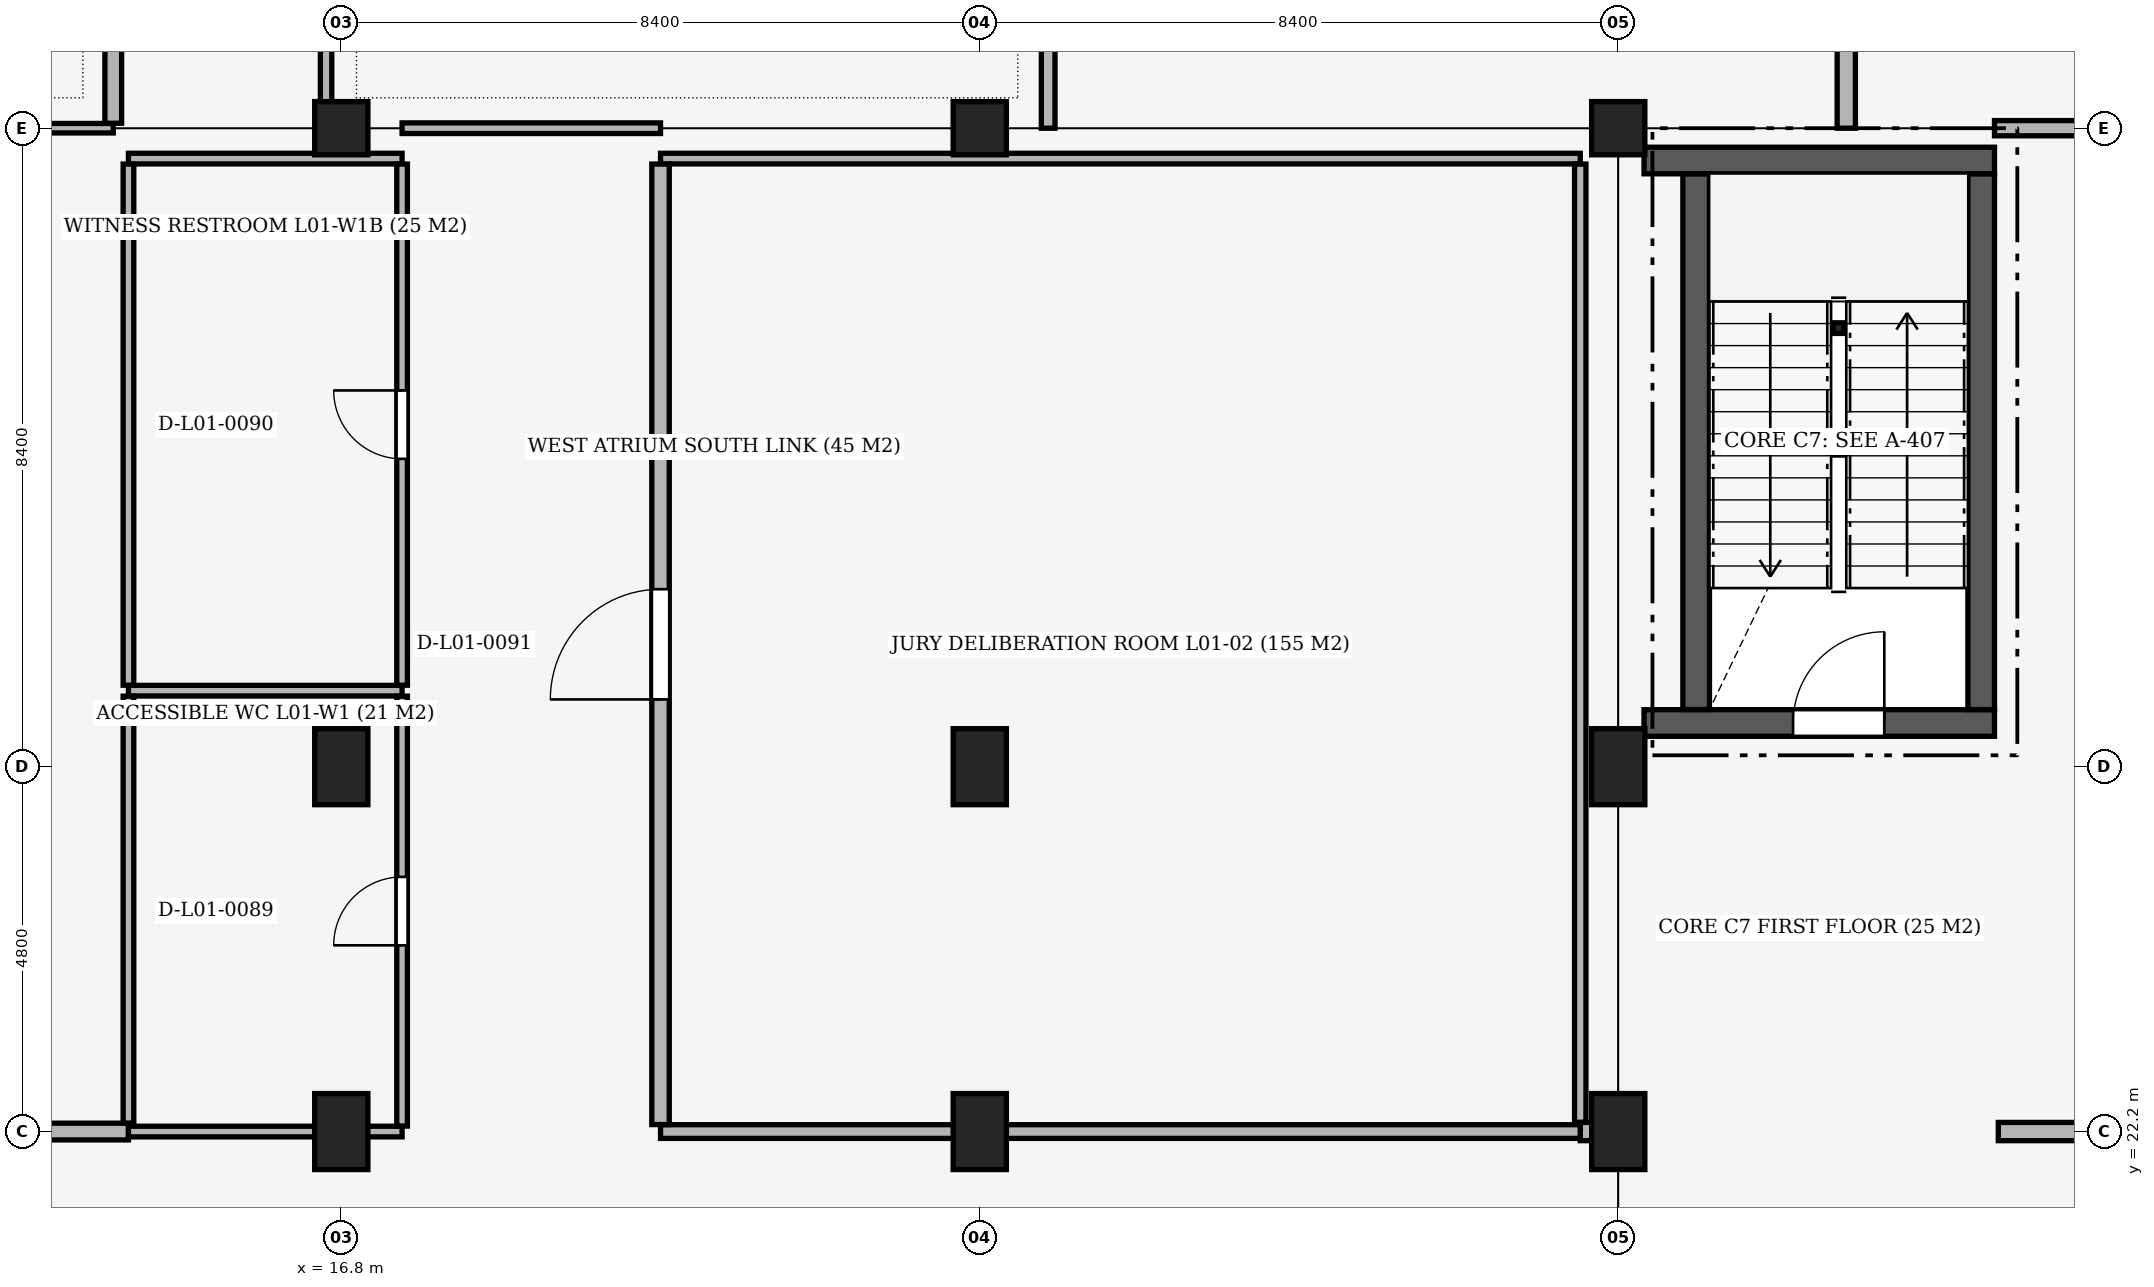
"""IFC4 building model, lengths in metres.
Left out: names, types, materials, properties, quantities, classifications, styles, units other than length and angle.
Written with IfcOpenShell. Run it as: python <this file> out.ifc"""

import sys

from ifc_helpers import new_model, si_unit, direction, frame, frame_2d, origin, origin_2d, place, context, subcontext, project, spatial, rectangle, hollow_circle, extrude, element, fill, save


model = new_model("IFC4")
c1 = context("Model", 3, precision=1e-05, world=origin(), true_north=direction((0.0, 1.0)))
c2 = subcontext(c1, "Body", "Model", "MODEL_VIEW")
j1 = project(units=[si_unit("LENGTHUNIT", "METRE"), si_unit("PLANEANGLEUNIT", "RADIAN")], contexts=[c1])
p1 = place(None, origin())
s1 = spatial("IfcSite", under=j1, at=p1, CompositionType="ELEMENT")
p2 = place(p1, origin())
s2 = spatial("IfcBuilding", under=s1, at=p2, CompositionType="ELEMENT")
p3 = place(p2, frame((0.0, 0.0, 5.1)))
s3 = spatial("IfcBuildingStorey", under=s2, at=p3, CompositionType="ELEMENT", Elevation=5.1)
for number, where, z_axis, x_axis in (
    (1, (16.8, 22.2, 0.0), (0.0, 0.0, 1.0), (1.0, 0.0, 0.0)),
    (2, (16.8, 27.0, 0.0), (0.0, 0.0, 1.0), (1.0, 0.0, 0.0)),
):
    element("IfcColumn", number, at=place(p3, frame(where, z_axis=z_axis, x_axis=x_axis)), inside=s3, PredefinedType="COLUMN", context=c2, shape_type="SweptSolid", body=[
        extrude(rectangle(XDim=0.7, YDim=1.0, at=origin_2d()), origin(), (0.0, 0.0, 1.0), 5.1),
    ])
p4 = place(p3, frame((16.8, 35.4, 0.0), z_axis=(0.0, 0.0, 1.0), x_axis=(1.0, 0.0, 0.0)))
e3 = element("IfcColumn", 3, at=p4, inside=s3, PredefinedType="COLUMN", context=c2, shape_type="SweptSolid", body=[
    extrude(rectangle(XDim=0.7, YDim=0.7, at=origin_2d()), origin(), (0.0, 0.0, 1.0), 5.1),
])
for number, where, z_axis, x_axis in (
    (4, (25.2, 22.2, 0.0), (0.0, 0.0, 1.0), (1.0, 0.0, 0.0)),
    (5, (25.2, 27.0, 0.0), (0.0, 0.0, 1.0), (1.0, 0.0, 0.0)),
):
    element("IfcColumn", number, at=place(p3, frame(where, z_axis=z_axis, x_axis=x_axis)), inside=s3, PredefinedType="COLUMN", context=c2, shape_type="SweptSolid", body=[
        extrude(rectangle(XDim=0.7, YDim=1.0, at=origin_2d()), origin(), (0.0, 0.0, 1.0), 5.1),
    ])
p5 = place(p3, frame((25.2, 35.4, 0.0), z_axis=(0.0, 0.0, 1.0), x_axis=(1.0, 0.0, 0.0)))
e6 = element("IfcColumn", 6, at=p5, inside=s3, PredefinedType="COLUMN", context=c2, shape_type="SweptSolid", body=[
    extrude(rectangle(XDim=0.7, YDim=0.7, at=origin_2d()), origin(), (0.0, 0.0, 1.0), 5.1),
])
for number, where, z_axis, x_axis in (
    (7, (33.6, 22.2, 0.0), (0.0, 0.0, 1.0), (1.0, 0.0, 0.0)),
    (8, (33.6, 27.0, 0.0), (0.0, 0.0, 1.0), (1.0, 0.0, 0.0)),
):
    element("IfcColumn", number, at=place(p3, frame(where, z_axis=z_axis, x_axis=x_axis)), inside=s3, PredefinedType="COLUMN", context=c2, shape_type="SweptSolid", body=[
        extrude(rectangle(XDim=0.7, YDim=1.0, at=origin_2d()), origin(), (0.0, 0.0, 1.0), 5.1),
    ])
p6 = place(p3, frame((33.6, 35.4, 0.0), z_axis=(0.0, 0.0, 1.0), x_axis=(1.0, 0.0, 0.0)))
e9 = element("IfcColumn", 9, at=p6, inside=s3, PredefinedType="COLUMN", context=c2, shape_type="SweptSolid", body=[
    extrude(rectangle(XDim=0.7, YDim=0.7, at=origin_2d()), origin(), (0.0, 0.0, 1.0), 5.1),
])
for number, where, z_axis, x_axis in (
    (10, (36.5, 32.77, -2.98), (0.0, 0.0, 1.0), (1.0, 0.0, 0.0)),
    (11, (36.5, 31.17, -2.98), (0.0, 0.0, 1.0), (1.0, 0.0, 0.0)),
):
    element("IfcColumn", number, at=place(p3, frame(where, z_axis=z_axis, x_axis=x_axis)), inside=s3, PredefinedType="COLUMN", context=c2, shape_type="SweptSolid", body=[
        extrude(hollow_circle(Radius=0.07, WallThickness=0.008, at=origin_2d()), origin(), (0.0, 0.0, 1.0), 5.1),
    ])
p7 = place(p3, frame((33.939, 34.975, 0.0), z_axis=(0.0, 0.0, 1.0), x_axis=(1.0, 0.0, 0.0)))
e12 = element("IfcWall", 12, at=p7, inside=s3, PredefinedType="SHEAR", context=c2, shape_type="SweptSolid", body=[
    extrude(rectangle(XDim=4.611, YDim=0.35, at=frame_2d((2.306, 0.0))), origin(), (0.0, 0.0, 1.0), 4.82),
])
p8 = place(p3, frame((33.939, 27.575, 0.0), z_axis=(0.0, 0.0, 1.0), x_axis=(1.0, 0.0, 0.0)))
e13 = element("IfcWall", 13, at=p8, inside=s3, PredefinedType="SHEAR", context=c2, shape_type="SweptSolid", body=[
    extrude(rectangle(XDim=4.611, YDim=0.35, at=frame_2d((2.306, 0.0))), origin(), (0.0, 0.0, 1.0), 4.82),
])
p9 = place(p8, frame((1.961, 0.0, 0.0)))
e14 = element("IfcOpeningElement", 14, at=p9, cuts=e13, PredefinedType="OPENING", context=c2, shape_type="SweptSolid", body=[
    extrude(rectangle(XDim=1.2, YDim=2.2, at=frame_2d((0.6, 1.1))), frame((0.0, 0.19, 0.0), z_axis=(0.0, -1.0, 0.0), x_axis=(1.0, 0.0, 0.0)), (0.0, 0.0, 1.0), 0.38),
])
for number, where, z_axis, x_axis in (
    (15, (34.625, 27.752, 0.0), (0.0, 0.0, 1.0), (0.0, 1.0, 0.0)),
    (16, (38.375, 27.752, 0.0), (0.0, 0.0, 1.0), (0.0, 1.0, 0.0)),
):
    element("IfcWall", number, at=place(p3, frame(where, z_axis=z_axis, x_axis=x_axis)), inside=s3, PredefinedType="SHEAR", context=c2, shape_type="SweptSolid", body=[
        extrude(rectangle(XDim=7.046, YDim=0.35, at=frame_2d((3.523, 0.0))), origin(), (0.0, 0.0, 1.0), 4.82),
    ])
p10 = place(p3, frame((33.1, 22.2, 0.0), z_axis=(0.0, 0.0, 1.0), x_axis=(1.0, 0.0, 0.0)))
e17 = element("IfcWall", 17, at=p10, inside=s3, PredefinedType="PARTITIONING", context=c2, shape_type="SweptSolid", body=[
    extrude(rectangle(XDim=0.5, YDim=0.24, at=frame_2d((0.25, 0.0))), origin(), (0.0, 0.0, 1.0), 4.07),
])
p11 = place(p3, frame((0.5, 22.2, 0.0), z_axis=(0.0, 0.0, 1.0), x_axis=(1.0, 0.0, 0.0)))
e18 = element("IfcWall", 18, at=p11, inside=s3, PredefinedType="PARTITIONING", context=c2, shape_type="SweptSolid", body=[
    extrude(rectangle(XDim=13.5, YDim=0.22, at=frame_2d((6.75, 0.0))), origin(), (0.0, 0.0, 1.0), 4.07),
])
p12 = place(p11, frame((5.375, 0.0, 0.0)))
e19 = element("IfcOpeningElement", 19, at=p12, cuts=e18, PredefinedType="OPENING", context=c2, shape_type="SweptSolid", body=[
    extrude(rectangle(XDim=0.95, YDim=2.1, at=frame_2d((0.475, 1.05))), frame((0.0, 0.125, 0.0), z_axis=(0.0, -1.0, 0.0), x_axis=(1.0, 0.0, 0.0)), (0.0, 0.0, 1.0), 0.25),
])
p13 = place(p3, frame((14.0, 22.2, 0.0), z_axis=(0.0, 0.0, 1.0), x_axis=(1.0, 0.0, 0.0)))
e20 = element("IfcWall", 20, at=p13, inside=s3, PredefinedType="PARTITIONING", context=c2, shape_type="SweptSolid", body=[
    extrude(rectangle(XDim=3.6, YDim=0.14, at=frame_2d((1.8, 0.0))), origin(), (0.0, 0.0, 1.0), 4.07),
])
p14 = place(p3, frame((21.0, 22.2, 0.0), z_axis=(0.0, 0.0, 1.0), x_axis=(1.0, 0.0, 0.0)))
e21 = element("IfcWall", 21, at=p14, inside=s3, PredefinedType="PARTITIONING", context=c2, shape_type="SweptSolid", body=[
    extrude(rectangle(XDim=12.1, YDim=0.18, at=frame_2d((6.05, 0.0))), origin(), (0.0, 0.0, 1.0), 4.07),
])
p15 = place(p3, frame((38.6, 22.2, 0.0), z_axis=(0.0, 0.0, 1.0), x_axis=(1.0, 0.0, 0.0)))
e22 = element("IfcWall", 22, at=p15, inside=s3, PredefinedType="PARTITIONING", context=c2, shape_type="SweptSolid", body=[
    extrude(rectangle(XDim=10.4, YDim=0.24, at=frame_2d((5.2, 0.0))), origin(), (0.0, 0.0, 1.0), 4.07),
])
p16 = place(p15, frame((5.025, 0.0, 0.0)))
e23 = element("IfcOpeningElement", 23, at=p16, cuts=e22, PredefinedType="OPENING", context=c2, shape_type="SweptSolid", body=[
    extrude(rectangle(XDim=1.25, YDim=2.2, at=frame_2d((0.625, 1.1))), frame((0.0, 0.135, 0.0), z_axis=(0.0, -1.0, 0.0), x_axis=(1.0, 0.0, 0.0)), (0.0, 0.0, 1.0), 0.27),
])
for number, where, z_axis, x_axis in (
    (24, (14.0, 28.0, 0.0), (0.0, 0.0, 1.0), (1.0, 0.0, 0.0)),
    (25, (14.0, 35.0, 0.0), (0.0, 0.0, 1.0), (1.0, 0.0, 0.0)),
):
    element("IfcWall", number, at=place(p3, frame(where, z_axis=z_axis, x_axis=x_axis)), inside=s3, PredefinedType="PARTITIONING", context=c2, shape_type="SweptSolid", body=[
        extrude(rectangle(XDim=3.6, YDim=0.14, at=frame_2d((1.8, 0.0))), origin(), (0.0, 0.0, 1.0), 4.02),
    ])
p17 = place(p3, frame((21.0, 35.0, 0.0), z_axis=(0.0, 0.0, 1.0), x_axis=(1.0, 0.0, 0.0)))
e26 = element("IfcWall", 26, at=p17, inside=s3, PredefinedType="PARTITIONING", context=c2, shape_type="SweptSolid", body=[
    extrude(rectangle(XDim=12.1, YDim=0.14, at=frame_2d((6.05, 0.0))), origin(), (0.0, 0.0, 1.0), 4.02),
])
p18 = place(p3, frame((17.6, 35.4, 0.0), z_axis=(0.0, 0.0, 1.0), x_axis=(1.0, 0.0, 0.0)))
e27 = element("IfcWall", 27, at=p18, inside=s3, PredefinedType="PARTITIONING", context=c2, shape_type="SweptSolid", body=[
    extrude(rectangle(XDim=3.4, YDim=0.14, at=frame_2d((1.7, 0.0))), origin(), (0.0, 0.0, 1.0), 4.07),
])
p19 = place(p3, frame((8.425, 35.4, 0.0), z_axis=(0.0, 0.0, 1.0), x_axis=(1.0, 0.0, 0.0)))
e28 = element("IfcWall", 28, at=p19, inside=s3, PredefinedType="PARTITIONING", context=c2, shape_type="SweptSolid", body=[
    extrude(rectangle(XDim=5.375, YDim=0.125, at=frame_2d((2.688, 0.0))), origin(), (0.0, 0.0, 1.0), 4.07),
])
p20 = place(p3, frame((38.55, 35.4, 0.0), z_axis=(0.0, 0.0, 1.0), x_axis=(1.0, 0.0, 0.0)))
e29 = element("IfcWall", 29, at=p20, inside=s3, PredefinedType="PARTITIONING", context=c2, shape_type="SweptSolid", body=[
    extrude(rectangle(XDim=3.415, YDim=0.2, at=frame_2d((1.708, 0.0))), origin(), (0.0, 0.0, 1.0), 4.07),
])
p21 = place(p3, frame((13.8, 35.465, 0.0), z_axis=(0.0, 0.0, 1.0), x_axis=(0.0, 1.0, 0.0)))
e30 = element("IfcWall", 30, at=p21, inside=s3, PredefinedType="PARTITIONING", context=c2, shape_type="SweptSolid", body=[
    extrude(rectangle(XDim=64.058, YDim=0.22, at=frame_2d((32.029, 0.0))), origin(), (0.0, 0.0, 1.0), 4.07),
])
p22 = place(p21, frame((31.229, 0.0, 0.0)))
e31 = element("IfcOpeningElement", 31, at=p22, cuts=e30, PredefinedType="OPENING", context=c2, shape_type="SweptSolid", body=[
    extrude(rectangle(XDim=1.6, YDim=2.3, at=frame_2d((0.8, 1.15))), frame((0.0, 0.125, 0.0), z_axis=(0.0, -1.0, 0.0), x_axis=(1.0, 0.0, 0.0)), (0.0, 0.0, 1.0), 0.25),
])
p23 = place(p3, frame((14.0, 22.312, 0.0), z_axis=(0.0, 0.0, 1.0), x_axis=(0.0, 1.0, 0.0)))
e32 = element("IfcWall", 32, at=p23, inside=s3, PredefinedType="PARTITIONING", context=c2, shape_type="SweptSolid", body=[
    extrude(rectangle(XDim=5.616, YDim=0.14, at=frame_2d((2.808, 0.0))), origin(), (0.0, 0.0, 1.0), 4.07),
])
p24 = place(p3, frame((14.0, 28.072, 0.0), z_axis=(0.0, 0.0, 1.0), x_axis=(0.0, 1.0, 0.0)))
e33 = element("IfcWall", 33, at=p24, inside=s3, PredefinedType="PARTITIONING", context=c2, shape_type="SweptSolid", body=[
    extrude(rectangle(XDim=6.856, YDim=0.14, at=frame_2d((3.428, 0.0))), origin(), (0.0, 0.0, 1.0), 4.37),
])
p25 = place(p3, frame((16.6, 35.4, 0.0), z_axis=(0.0, 0.0, 1.0), x_axis=(0.0, 1.0, 0.0)))
e34 = element("IfcWall", 34, at=p25, inside=s3, PredefinedType="PARTITIONING", context=c2, shape_type="SweptSolid", body=[
    extrude(rectangle(XDim=10.108, YDim=0.15, at=frame_2d((5.054, 0.0))), origin(), (0.0, 0.0, 1.0), 4.02),
])
p26 = place(p25, frame((2.254, 0.0, 0.0)))
e35 = element("IfcOpeningElement", 35, at=p26, cuts=e34, PredefinedType="OPENING", context=c2, shape_type="SweptSolid", body=[
    extrude(rectangle(XDim=1.6, YDim=2.3, at=frame_2d((0.8, 1.15))), frame((0.0, 0.09, 0.0), z_axis=(0.0, -1.0, 0.0), x_axis=(1.0, 0.0, 0.0)), (0.0, 0.0, 1.0), 0.18),
])
p27 = place(p3, frame((17.6, 22.272, 0.0), z_axis=(0.0, 0.0, 1.0), x_axis=(0.0, 1.0, 0.0)))
e36 = element("IfcWall", 36, at=p27, inside=s3, PredefinedType="PARTITIONING", context=c2, shape_type="SweptSolid", body=[
    extrude(rectangle(XDim=5.656, YDim=0.14, at=frame_2d((2.828, 0.0))), origin(), (0.0, 0.0, 1.0), 4.07),
])
p28 = place(p27, frame((2.378, 0.0, 0.0)))
e37 = element("IfcOpeningElement", 37, at=p28, cuts=e36, PredefinedType="OPENING", context=c2, shape_type="SweptSolid", body=[
    extrude(rectangle(XDim=0.9, YDim=2.1, at=frame_2d((0.45, 1.05))), frame((0.0, 0.085, 0.0), z_axis=(0.0, -1.0, 0.0), x_axis=(1.0, 0.0, 0.0)), (0.0, 0.0, 1.0), 0.17),
])
p29 = place(p3, frame((17.6, 28.072, 0.0), z_axis=(0.0, 0.0, 1.0), x_axis=(0.0, 1.0, 0.0)))
e38 = element("IfcWall", 38, at=p29, inside=s3, PredefinedType="PARTITIONING", context=c2, shape_type="SweptSolid", body=[
    extrude(rectangle(XDim=6.856, YDim=0.14, at=frame_2d((3.428, 0.0))), origin(), (0.0, 0.0, 1.0), 4.37),
])
p30 = place(p29, frame((2.978, 0.0, 0.0)))
e39 = element("IfcOpeningElement", 39, at=p30, cuts=e38, PredefinedType="OPENING", context=c2, shape_type="SweptSolid", body=[
    extrude(rectangle(XDim=0.9, YDim=2.1, at=frame_2d((0.45, 1.05))), frame((0.0, 0.085, 0.0), z_axis=(0.0, -1.0, 0.0), x_axis=(1.0, 0.0, 0.0)), (0.0, 0.0, 1.0), 0.17),
])
p31 = place(p3, frame((21.0, 22.292, 0.0), z_axis=(0.0, 0.0, 1.0), x_axis=(0.0, 1.0, 0.0)))
e40 = element("IfcWall", 40, at=p31, inside=s3, PredefinedType="SOLIDWALL", context=c2, shape_type="SweptSolid", body=[
    extrude(rectangle(XDim=12.636, YDim=0.23, at=frame_2d((6.318, 0.0))), origin(), (0.0, 0.0, 1.0), 4.07),
])
p32 = place(p31, frame((5.593, 0.0, 0.0)))
e41 = element("IfcOpeningElement", 41, at=p32, cuts=e40, PredefinedType="OPENING", context=c2, shape_type="SweptSolid", body=[
    extrude(rectangle(XDim=1.45, YDim=2.25, at=frame_2d((0.725, 1.125))), frame((0.0, 0.13, 0.0), z_axis=(0.0, -1.0, 0.0), x_axis=(1.0, 0.0, 0.0)), (0.0, 0.0, 1.0), 0.26),
])
p33 = place(p3, frame((26.1, 35.4, 0.0), z_axis=(0.0, 0.0, 1.0), x_axis=(0.0, 1.0, 0.0)))
e42 = element("IfcWall", 42, at=p33, inside=s3, PredefinedType="PARTITIONING", context=c2, shape_type="SweptSolid", body=[
    extrude(rectangle(XDim=3.648, YDim=0.18, at=frame_2d((1.824, 0.0))), origin(), (0.0, 0.0, 1.0), 4.07),
])
p34 = place(p3, frame((33.1, 22.322, 0.0), z_axis=(0.0, 0.0, 1.0), x_axis=(0.0, 1.0, 0.0)))
e43 = element("IfcWall", 43, at=p34, inside=s3, PredefinedType="PARTITIONING", context=c2, shape_type="SweptSolid", body=[
    extrude(rectangle(XDim=12.606, YDim=0.15, at=frame_2d((6.303, 0.0))), origin(), (0.0, 0.0, 1.0), 4.07),
])
p35 = place(p3, frame((36.6, 35.4, 0.0), z_axis=(0.0, 0.0, 1.0), x_axis=(0.0, 1.0, 0.0)))
e44 = element("IfcWall", 44, at=p35, inside=s3, PredefinedType="PARTITIONING", context=c2, shape_type="SweptSolid", body=[
    extrude(rectangle(XDim=30.488, YDim=0.24, at=frame_2d((15.244, 0.0))), origin(), (0.0, 0.0, 1.0), 4.07),
])
p36 = place(p35, frame((14.794, 0.0, 0.0)))
e45 = element("IfcOpeningElement", 45, at=p36, cuts=e44, PredefinedType="OPENING", context=c2, shape_type="SweptSolid", body=[
    extrude(rectangle(XDim=0.9, YDim=2.2, at=frame_2d((0.45, 1.1))), frame((0.0, 0.135, 0.0), z_axis=(0.0, -1.0, 0.0), x_axis=(1.0, 0.0, 0.0)), (0.0, 0.0, 1.0), 0.27),
])
p37 = place(p9, origin())
e46 = element("IfcDoor", 46, at=p37, inside=s3, OperationType="SINGLE_SWING_RIGHT", PredefinedType="DOOR", context=c2, shape_type="SweptSolid", body=[
    extrude(rectangle(XDim=1.2, YDim=2.2, at=frame_2d((0.6, 1.1))), frame((0.0, 0.025, 0.0), z_axis=(0.0, -1.0, 0.0), x_axis=(1.0, 0.0, 0.0)), (0.0, 0.0, 1.0), 0.05),
])
fill(e14, e46)
p38 = place(p28, origin())
e47 = element("IfcDoor", 47, at=p38, inside=s3, OperationType="SINGLE_SWING_LEFT", PredefinedType="DOOR", context=c2, shape_type="SweptSolid", body=[
    extrude(rectangle(XDim=0.9, YDim=2.1, at=frame_2d((0.45, 1.05))), frame((0.0, 0.025, 0.0), z_axis=(0.0, -1.0, 0.0), x_axis=(1.0, 0.0, 0.0)), (0.0, 0.0, 1.0), 0.05),
])
fill(e37, e47)
p39 = place(p30, origin())
e48 = element("IfcDoor", 48, at=p39, inside=s3, OperationType="SINGLE_SWING_RIGHT", PredefinedType="DOOR", context=c2, shape_type="SweptSolid", body=[
    extrude(rectangle(XDim=0.9, YDim=2.1, at=frame_2d((0.45, 1.05))), frame((0.0, 0.025, 0.0), z_axis=(0.0, -1.0, 0.0), x_axis=(1.0, 0.0, 0.0)), (0.0, 0.0, 1.0), 0.05),
])
fill(e39, e48)
p40 = place(p32, origin())
e49 = element("IfcDoor", 49, at=p40, inside=s3, OperationType="SINGLE_SWING_LEFT", PredefinedType="DOOR", context=c2, shape_type="SweptSolid", body=[
    extrude(rectangle(XDim=1.45, YDim=2.25, at=frame_2d((0.725, 1.125))), frame((0.0, 0.025, 0.0), z_axis=(0.0, -1.0, 0.0), x_axis=(1.0, 0.0, 0.0)), (0.0, 0.0, 1.0), 0.05),
])
fill(e41, e49)
save(model, sys.argv[1])
